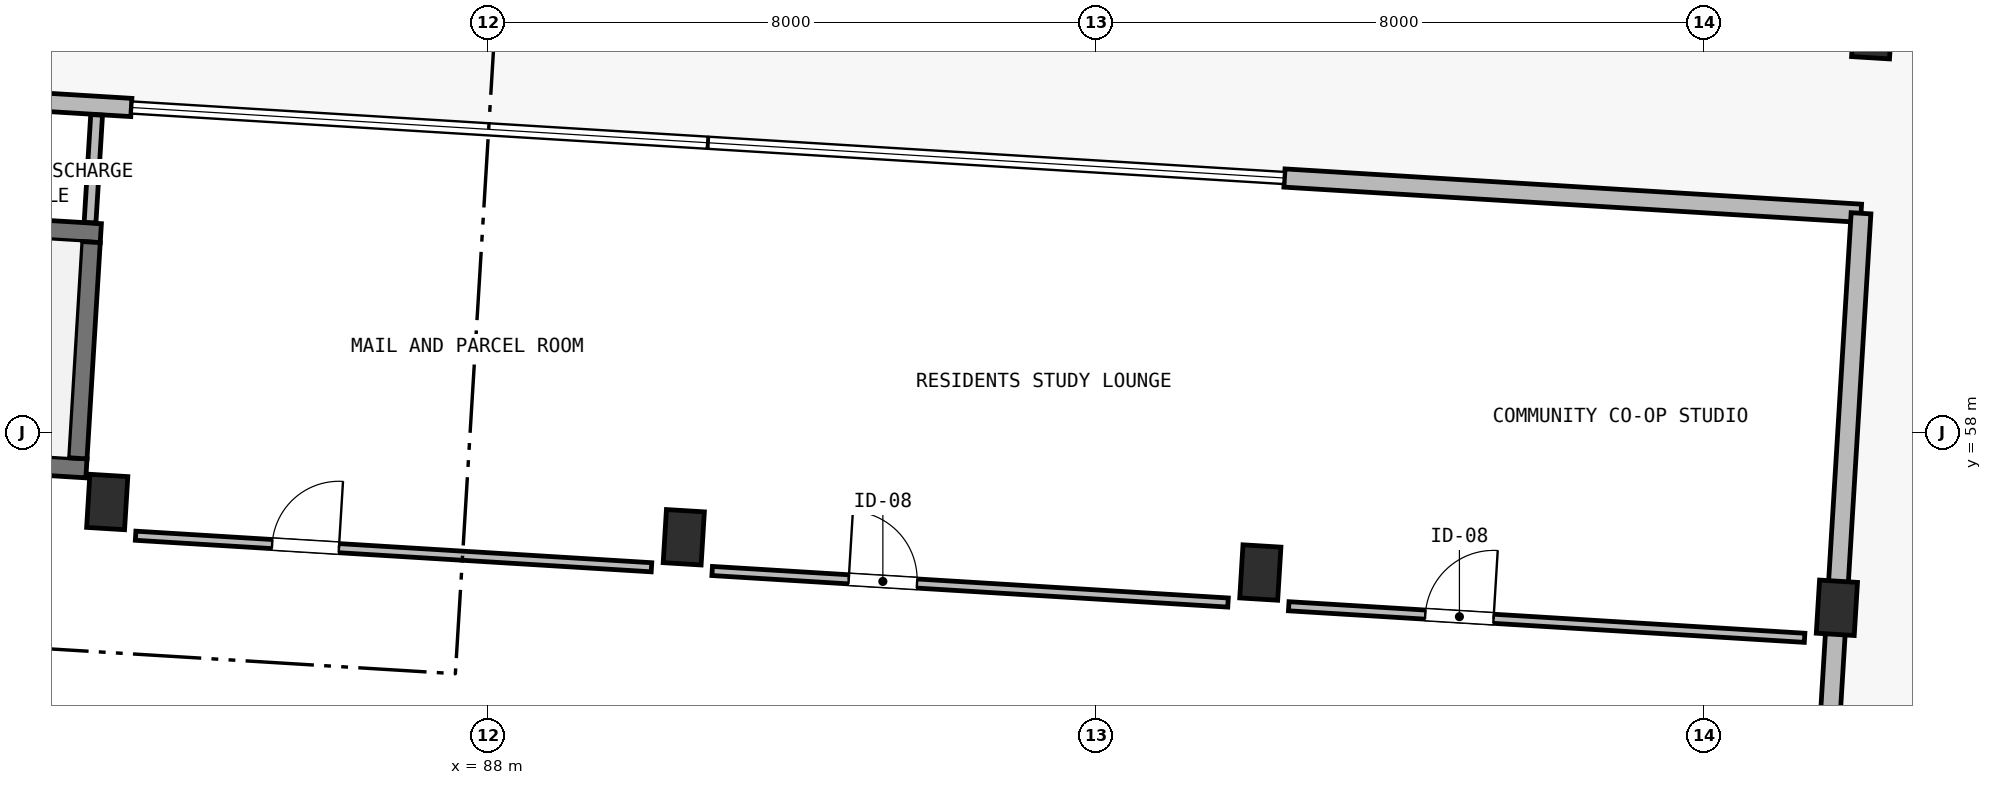
"""IFC4 building model, lengths in metres.
Left out: names, types, materials, properties, quantities, classifications, styles, units other than length and angle.
Written with IfcOpenShell. Run it as: python <this file> out.ifc"""

import sys

from ifc_helpers import new_model, si_unit, direction, frame, frame_2d, origin, origin_2d, place, context, subcontext, project, spatial, rectangle, extrude, element, fill, save


model = new_model("IFC4")
c1 = context("Model", 3, precision=1e-05, world=origin(), true_north=direction((0.0, 1.0)))
c2 = subcontext(c1, "Body", "Model", "MODEL_VIEW")
j1 = project(units=[si_unit("LENGTHUNIT", "METRE"), si_unit("PLANEANGLEUNIT", "RADIAN")], contexts=[c1])
p1 = place(None, origin())
s1 = spatial("IfcSite", under=j1, at=p1, CompositionType="ELEMENT")
p2 = place(p1, origin())
s2 = spatial("IfcBuilding", under=s1, at=p2, CompositionType="ELEMENT")
p3 = place(p2, origin())
s3 = spatial("IfcBuildingStorey", under=s2, at=p3, CompositionType="ELEMENT", Elevation=0.0)
for number, where, z_axis, x_axis in (
    (1, (82.99, 57.086, -0.35), (0.0, 0.0, 1.0), (0.998, -0.061, 0.0)),
    (2, (90.576, 56.622, -0.35), (0.0, 0.0, 1.0), (0.998, -0.061, 0.0)),
    (3, (98.162, 56.158, -0.35), (0.0, 0.0, 1.0), (0.998, -0.061, 0.0)),
    (4, (105.748, 55.694, -0.35), (0.0, 0.0, 1.0), (0.998, -0.061, 0.0)),
    (5, (106.211, 63.28, -0.35), (0.0, 0.0, 1.0), (0.998, -0.061, 0.0)),
):
    element("IfcColumn", number, at=place(p3, frame(where, z_axis=z_axis, x_axis=x_axis)), inside=s3, PredefinedType="COLUMN", context=c2, shape_type="SweptSolid", body=[
        extrude(rectangle(XDim=0.5, YDim=0.7, at=origin_2d()), origin(), (0.0, 0.0, 1.0), 4.85),
    ])
p4 = place(p3, frame((75.919, 61.05, -0.35), z_axis=(0.0, 0.0, 1.0), x_axis=(0.998135546153, -0.061036313012, 0.0)))
e6 = element("IfcWall", 6, at=p4, inside=s3, PredefinedType="SHEAR", context=c2, shape_type="SweptSolid", body=[
    extrude(rectangle(XDim=7.0, YDim=0.25, at=frame_2d((3.5, 0.0))), origin(), (0.0, 0.0, 1.0), 4.85),
])
p5 = place(p4, frame((0.45, 0.0, 0.35)))
e7 = element("IfcOpeningElement", 7, at=p5, cuts=e6, PredefinedType="OPENING", context=c2, shape_type="SweptSolid", body=[
    extrude(rectangle(XDim=1.12, YDim=2.15, at=frame_2d((0.56, 1.075))), frame((0.0, 0.14, 0.0), z_axis=(0.0, -1.0, 0.0), x_axis=(1.0, 0.0, 0.0)), (0.0, 0.0, 1.0), 0.28),
])
p6 = place(p3, frame((75.73, 57.956, -0.35), z_axis=(0.0, 0.0, 1.0), x_axis=(0.998135546153, -0.061036313012, 0.0)))
e8 = element("IfcWall", 8, at=p6, inside=s3, PredefinedType="SHEAR", context=c2, shape_type="SweptSolid", body=[
    extrude(rectangle(XDim=7.0, YDim=0.25, at=frame_2d((3.5, 0.0))), origin(), (0.0, 0.0, 1.0), 4.85),
])
p7 = place(p6, frame((0.45, 0.0, 0.35)))
e9 = element("IfcOpeningElement", 9, at=p7, cuts=e8, PredefinedType="OPENING", context=c2, shape_type="SweptSolid", body=[
    extrude(rectangle(XDim=1.05, YDim=2.15, at=frame_2d((0.525, 1.075))), frame((0.0, 0.14, 0.0), z_axis=(0.0, -1.0, 0.0), x_axis=(1.0, 0.0, 0.0)), (0.0, 0.0, 1.0), 0.28),
])
p8 = place(p3, frame((82.599, 57.661, -0.35), z_axis=(0.0, 0.0, 1.0), x_axis=(0.06107697143, 0.998133059046, 0.0)))
e10 = element("IfcWall", 10, at=p8, inside=s3, PredefinedType="SHEAR", context=c2, shape_type="SweptSolid", body=[
    extrude(rectangle(XDim=2.85, YDim=0.25, at=frame_2d((1.425, 0.0))), origin(), (0.0, 0.0, 1.0), 4.85),
])
p9 = place(p3, frame((75.722, 62.74, 0.0), z_axis=(0.0, 0.0, 1.0), x_axis=(0.998135669243, -0.061034300063, 0.0)))
e11 = element("IfcWall", 11, at=p9, inside=s3, PredefinedType="SOLIDWALL", context=c2, shape_type="SweptSolid", body=[
    extrude(rectangle(XDim=7.6, YDim=0.24, at=frame_2d((3.8, 0.0))), origin(), (0.0, 0.0, 1.0), 3.35),
])
p10 = place(p9, frame((3.25, 0.0, 0.0)))
e12 = element("IfcOpeningElement", 12, at=p10, cuts=e11, PredefinedType="OPENING", context=c2, shape_type="SweptSolid", body=[
    extrude(rectangle(XDim=1.1, YDim=2.15, at=frame_2d((0.55, 1.075))), frame((0.0, 0.135, 0.0), z_axis=(0.0, -1.0, 0.0), x_axis=(1.0, 0.0, 0.0)), (0.0, 0.0, 1.0), 0.27),
])
p11 = place(p3, frame((98.479, 61.348, 0.0), z_axis=(0.0, 0.0, 1.0), x_axis=(0.998133591969, -0.061068261669, 0.0)))
e13 = element("IfcWall", 13, at=p11, inside=s3, PredefinedType="SOLIDWALL", context=c2, shape_type="SweptSolid", body=[
    extrude(rectangle(XDim=7.6, YDim=0.24, at=frame_2d((3.8, 0.0))), origin(), (0.0, 0.0, 1.0), 3.35),
])
p12 = place(p3, frame((106.065, 60.884, 0.0), z_axis=(0.0, 0.0, 1.0), x_axis=(-0.06105237445, -0.998134563861, 0.0)))
e14 = element("IfcWall", 14, at=p12, inside=s3, PredefinedType="SOLIDWALL", context=c2, shape_type="SweptSolid", body=[
    extrude(rectangle(XDim=14.8, YDim=0.26, at=frame_2d((7.4, 0.0))), origin(), (0.0, 0.0, 1.0), 3.35),
])
p13 = place(p3, frame((83.364, 56.642, 0.0), z_axis=(0.0, 0.0, 1.0), x_axis=(0.998135500293, -0.061037062968, 0.0)))
e15 = element("IfcWall", 15, at=p13, inside=s3, PredefinedType="PARTITIONING", context=c2, shape_type="SweptSolid", body=[
    extrude(rectangle(XDim=6.8, YDim=0.12, at=frame_2d((3.4, 0.0))), origin(), (0.0, 0.0, 1.0), 4.22),
])
p14 = place(p13, frame((1.8, 0.0, 0.0)))
e16 = element("IfcOpeningElement", 16, at=p14, cuts=e15, PredefinedType="OPENING", context=c2, shape_type="SweptSolid", body=[
    extrude(rectangle(XDim=0.88, YDim=2.1, at=frame_2d((0.44, 1.05))), frame((0.0, 0.075, 0.0), z_axis=(0.0, -1.0, 0.0), x_axis=(1.0, 0.0, 0.0)), (0.0, 0.0, 1.0), 0.15),
])
p15 = place(p3, frame((90.949, 56.178, 0.0), z_axis=(0.0, 0.0, 1.0), x_axis=(0.998133446169, -0.061070644651, 0.0)))
e17 = element("IfcWall", 17, at=p15, inside=s3, PredefinedType="PARTITIONING", context=c2, shape_type="SweptSolid", body=[
    extrude(rectangle(XDim=6.8, YDim=0.12, at=frame_2d((3.4, 0.0))), origin(), (0.0, 0.0, 1.0), 4.22),
])
p16 = place(p15, frame((1.8, 0.0, 0.0)))
e18 = element("IfcOpeningElement", 18, at=p16, cuts=e17, PredefinedType="OPENING", context=c2, shape_type="SweptSolid", body=[
    extrude(rectangle(XDim=0.9, YDim=2.1, at=frame_2d((0.45, 1.05))), frame((0.0, 0.075, 0.0), z_axis=(0.0, -1.0, 0.0), x_axis=(1.0, 0.0, 0.0)), (0.0, 0.0, 1.0), 0.15),
])
p17 = place(p3, frame((98.535, 55.714, 0.0), z_axis=(0.0, 0.0, 1.0), x_axis=(0.998135634047, -0.061034875648, 0.0)))
e19 = element("IfcWall", 19, at=p17, inside=s3, PredefinedType="PARTITIONING", context=c2, shape_type="SweptSolid", body=[
    extrude(rectangle(XDim=6.8, YDim=0.12, at=frame_2d((3.4, 0.0))), origin(), (0.0, 0.0, 1.0), 4.22),
])
p18 = place(p17, frame((1.8, 0.0, 0.0)))
e20 = element("IfcOpeningElement", 20, at=p18, cuts=e19, PredefinedType="OPENING", context=c2, shape_type="SweptSolid", body=[
    extrude(rectangle(XDim=0.9, YDim=2.1, at=frame_2d((0.45, 1.05))), frame((0.0, 0.075, 0.0), z_axis=(0.0, -1.0, 0.0), x_axis=(1.0, 0.0, 0.0)), (0.0, 0.0, 1.0), 0.15),
])
p19 = place(p3, frame((82.764, 60.761, 0.0), z_axis=(0.0, 0.0, 1.0), x_axis=(0.061211444687, 0.998124821372, 0.0)))
e21 = element("IfcWall", 21, at=p19, inside=s3, PredefinedType="PARTITIONING", context=c2, shape_type="SweptSolid", body=[
    extrude(rectangle(XDim=1.42, YDim=0.155, at=frame_2d((0.71, 0.0))), origin(), (0.0, 0.0, 1.0), 3.35),
])
p20 = place(p14, origin())
e22 = element("IfcDoor", 22, at=p20, inside=s3, OperationType="SINGLE_SWING_RIGHT", PredefinedType="DOOR", context=c2, shape_type="SweptSolid", body=[
    extrude(rectangle(XDim=0.88, YDim=2.1, at=frame_2d((0.44, 1.05))), frame((0.0, 0.025, 0.0), z_axis=(0.0, -1.0, 0.0), x_axis=(1.0, 0.0, 0.0)), (0.0, 0.0, 1.0), 0.05),
])
fill(e16, e22)
p21 = place(p16, origin())
e23 = element("IfcDoor", 23, at=p21, inside=s3, OperationType="SINGLE_SWING_LEFT", PredefinedType="DOOR", context=c2, shape_type="SweptSolid", body=[
    extrude(rectangle(XDim=0.9, YDim=2.1, at=frame_2d((0.45, 1.05))), frame((0.0, 0.025, 0.0), z_axis=(0.0, -1.0, 0.0), x_axis=(1.0, 0.0, 0.0)), (0.0, 0.0, 1.0), 0.05),
])
fill(e18, e23)
p22 = place(p18, origin())
e24 = element("IfcDoor", 24, at=p22, inside=s3, OperationType="SINGLE_SWING_RIGHT", PredefinedType="DOOR", context=c2, shape_type="SweptSolid", body=[
    extrude(rectangle(XDim=0.9, YDim=2.1, at=frame_2d((0.45, 1.05))), frame((0.0, 0.025, 0.0), z_axis=(0.0, -1.0, 0.0), x_axis=(1.0, 0.0, 0.0)), (0.0, 0.0, 1.0), 0.05),
])
fill(e20, e24)
save(model, sys.argv[1])
